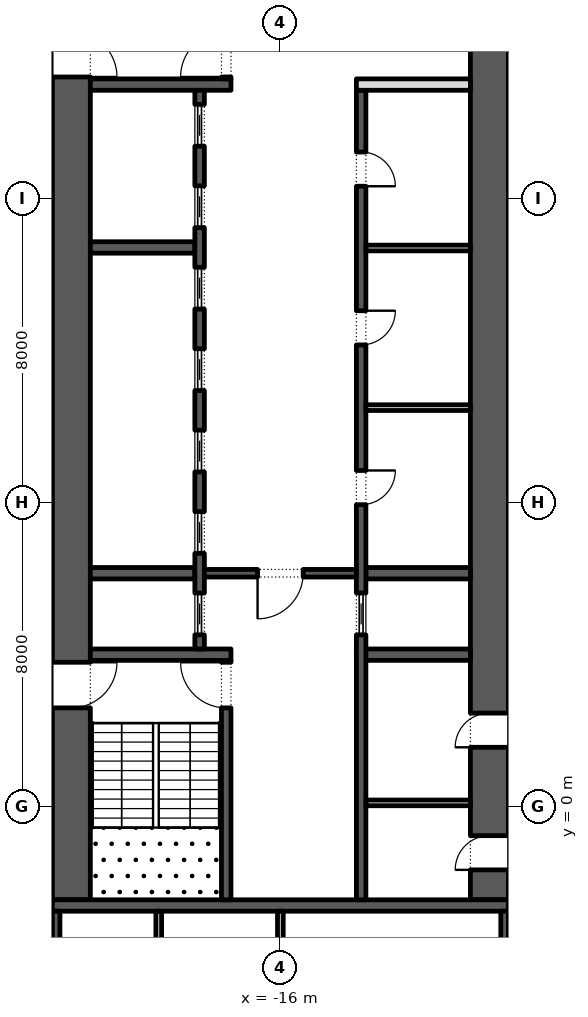
"""IFC4 building model, lengths in metres.
Left out: names, types, materials, properties, quantities, classifications, styles, units other than length and angle.
Written with IfcOpenShell. Run it as: python <this file> out.ifc"""

import sys

from ifc_helpers import new_model, si_unit, direction, frame, frame_2d, origin, place, context, subcontext, project, spatial, rectangle, extrude, element, fill, save


model = new_model("IFC4")
c1 = context("Model", 3, precision=1e-05, world=origin(), true_north=direction((0.0, 1.0)))
c2 = subcontext(c1, "Body", "Model", "MODEL_VIEW")
j1 = project(units=[si_unit("LENGTHUNIT", "METRE"), si_unit("PLANEANGLEUNIT", "RADIAN")], contexts=[c1])
p1 = place(None, origin())
s1 = spatial("IfcSite", under=j1, at=p1, CompositionType="ELEMENT")
p2 = place(p1, origin())
s2 = spatial("IfcBuilding", under=s1, at=p2, CompositionType="ELEMENT")
p3 = place(p2, frame((0.0, 0.0, 90.0)))
s3 = spatial("IfcBuildingStorey", under=s2, at=p3, CompositionType="ELEMENT", Elevation=90.0)
p4 = place(p3, frame((-21.5, -2.45, 0.0), z_axis=(0.0, 0.0, 1.0), x_axis=(0.0, 1.0, 0.0)))
e1 = element("IfcWall", 1, at=p4, inside=s3, PredefinedType="SHEAR", context=c2, shape_type="SweptSolid", body=[
    extrude(rectangle(XDim=27.9, YDim=1.0, at=frame_2d((13.95, 0.0))), origin(), (0.0, 0.0, 1.0), 3.9),
])
p5 = place(p4, frame((5.05, 0.0, 0.0)))
e2 = element("IfcOpeningElement", 2, at=p5, cuts=e1, PredefinedType="OPENING", context=c2, shape_type="SweptSolid", body=[
    extrude(rectangle(XDim=1.2, YDim=2.1, at=frame_2d((0.6, 1.05))), frame((0.0, 0.51, 0.0), z_axis=(0.0, -1.0, 0.0), x_axis=(1.0, 0.0, 0.0)), (0.0, 0.0, 1.0), 1.02),
])
p6 = place(p4, frame((21.65, 0.0, 0.0)))
e3 = element("IfcOpeningElement", 3, at=p6, cuts=e1, PredefinedType="OPENING", context=c2, shape_type="SweptSolid", body=[
    extrude(rectangle(XDim=1.2, YDim=2.1, at=frame_2d((0.6, 1.05))), frame((0.0, 0.51, 0.0), z_axis=(0.0, -1.0, 0.0), x_axis=(1.0, 0.0, 0.0)), (0.0, 0.0, 1.0), 1.02),
])
p7 = place(p3, frame((-10.5, -2.45, 0.0), z_axis=(0.0, 0.0, 1.0), x_axis=(0.0, 1.0, 0.0)))
e4 = element("IfcWall", 4, at=p7, inside=s3, PredefinedType="SHEAR", context=c2, shape_type="SweptSolid", body=[
    extrude(rectangle(XDim=27.9, YDim=1.0, at=frame_2d((13.95, 0.0))), origin(), (0.0, 0.0, 1.0), 3.9),
])
p8 = place(p7, frame((23.65, 0.0, 0.0)))
e5 = element("IfcOpeningElement", 5, at=p8, cuts=e4, PredefinedType="OPENING", context=c2, shape_type="SweptSolid", body=[
    extrude(rectangle(XDim=2.4, YDim=2.1, at=frame_2d((1.2, 1.05))), frame((0.0, 0.51, 0.0), z_axis=(0.0, -1.0, 0.0), x_axis=(1.0, 0.0, 0.0)), (0.0, 0.0, 1.0), 1.02),
])
p9 = place(p7, frame((0.788, 0.0, 0.0)))
e6 = element("IfcOpeningElement", 6, at=p9, cuts=e4, PredefinedType="OPENING", context=c2, shape_type="SweptSolid", body=[
    extrude(rectangle(XDim=0.9, YDim=2.1, at=frame_2d((0.45, 1.05))), frame((0.0, 0.51, 0.0), z_axis=(0.0, -1.0, 0.0), x_axis=(1.0, 0.0, 0.0)), (0.0, 0.0, 1.0), 1.02),
])
p10 = place(p7, frame((4.012, 0.0, 0.0)))
e7 = element("IfcOpeningElement", 7, at=p10, cuts=e4, PredefinedType="OPENING", context=c2, shape_type="SweptSolid", body=[
    extrude(rectangle(XDim=0.9, YDim=2.1, at=frame_2d((0.45, 1.05))), frame((0.0, 0.51, 0.0), z_axis=(0.0, -1.0, 0.0), x_axis=(1.0, 0.0, 0.0)), (0.0, 0.0, 1.0), 1.02),
])
p11 = place(p3, frame((-22.0, -2.6, 0.0), z_axis=(0.0, 0.0, 1.0), x_axis=(1.0, 0.0, 0.0)))
e8 = element("IfcWall", 8, at=p11, inside=s3, PredefinedType="SHEAR", context=c2, shape_type="SweptSolid", body=[
    extrude(rectangle(XDim=12.0, YDim=0.3, at=frame_2d((6.0, 0.0))), origin(), (0.0, 0.0, 1.0), 3.9),
])
p12 = place(p3, frame((-21.0, 4.0, 0.0), z_axis=(0.0, 0.0, 1.0), x_axis=(1.0, 0.0, 0.0)))
e9 = element("IfcWall", 9, at=p12, inside=s3, PredefinedType="SHEAR", context=c2, shape_type="SweptSolid", body=[
    extrude(rectangle(XDim=3.7, YDim=0.3, at=frame_2d((1.85, 0.0))), origin(), (0.0, 0.0, 1.0), 3.9),
])
p13 = place(p3, frame((-17.425, -2.45, 0.0), z_axis=(0.0, 0.0, 1.0), x_axis=(0.0, 1.0, 0.0)))
e10 = element("IfcWall", 10, at=p13, inside=s3, PredefinedType="SHEAR", context=c2, shape_type="SweptSolid", body=[
    extrude(rectangle(XDim=6.3, YDim=0.25, at=frame_2d((3.15, 0.0))), origin(), (0.0, 0.0, 1.0), 3.9),
])
p14 = place(p13, frame((5.05, 0.0, 0.0)))
e11 = element("IfcOpeningElement", 11, at=p14, cuts=e10, PredefinedType="OPENING", context=c2, shape_type="SweptSolid", body=[
    extrude(rectangle(XDim=1.2, YDim=2.1, at=frame_2d((0.6, 1.05))), frame((0.0, 0.135, 0.0), z_axis=(0.0, -1.0, 0.0), x_axis=(1.0, 0.0, 0.0)), (0.0, 0.0, 1.0), 0.27),
])
p15 = place(p3, frame((-21.0, 19.0, 0.0), z_axis=(0.0, 0.0, 1.0), x_axis=(1.0, 0.0, 0.0)))
e12 = element("IfcWall", 12, at=p15, inside=s3, PredefinedType="SHEAR", context=c2, shape_type="SweptSolid", body=[
    extrude(rectangle(XDim=3.7, YDim=0.3, at=frame_2d((1.85, 0.0))), origin(), (0.0, 0.0, 1.0), 3.9),
])
p16 = place(p3, frame((-17.425, 19.15, 0.0), z_axis=(0.0, 0.0, 1.0), x_axis=(0.0, 1.0, 0.0)))
e13 = element("IfcWall", 13, at=p16, inside=s3, PredefinedType="SHEAR", context=c2, shape_type="SweptSolid", body=[
    extrude(rectangle(XDim=6.3, YDim=0.25, at=frame_2d((3.15, 0.0))), origin(), (0.0, 0.0, 1.0), 3.9),
])
p17 = place(p16, frame((0.05, 0.0, 0.0)))
e14 = element("IfcOpeningElement", 14, at=p17, cuts=e13, PredefinedType="OPENING", context=c2, shape_type="SweptSolid", body=[
    extrude(rectangle(XDim=1.2, YDim=2.1, at=frame_2d((0.6, 1.05))), frame((0.0, 0.135, 0.0), z_axis=(0.0, -1.0, 0.0), x_axis=(1.0, 0.0, 0.0)), (0.0, 0.0, 1.0), 0.27),
])
for number, where, z_axis, x_axis in (
    (15, (-21.0, 6.143, 0.0), (0.0, 0.0, 1.0), (1.0, 0.0, 0.0)),
    (16, (-21.0, 14.714, 0.0), (0.0, 0.0, 1.0), (1.0, 0.0, 0.0)),
):
    element("IfcWall", number, at=place(p3, frame(where, z_axis=z_axis, x_axis=x_axis)), inside=s3, PredefinedType="SHEAR", context=c2, shape_type="SweptSolid", body=[
        extrude(rectangle(XDim=2.75, YDim=0.3, at=frame_2d((1.375, 0.0))), origin(), (0.0, 0.0, 1.0), 3.9),
    ])
p18 = place(p3, frame((-18.125, 4.15, 0.0), z_axis=(0.0, 0.0, 1.0), x_axis=(0.0, 1.0, 0.0)))
e17 = element("IfcWall", 17, at=p18, inside=s3, PredefinedType="SHEAR", context=c2, shape_type="SweptSolid", body=[
    extrude(rectangle(XDim=14.7, YDim=0.25, at=frame_2d((7.35, 0.0))), origin(), (0.0, 0.0, 1.0), 3.9),
])
p19 = place(p18, frame((0.371, 0.0, 0.0)))
e18 = element("IfcOpeningElement", 18, at=p19, cuts=e17, PredefinedType="OPENING", context=c2, shape_type="SweptSolid", body=[
    extrude(rectangle(XDim=1.1, YDim=2.1, at=frame_2d((0.55, 1.05))), frame((0.0, 0.135, 0.0), z_axis=(0.0, -1.0, 0.0), x_axis=(1.0, 0.0, 0.0)), (0.0, 0.0, 1.0), 0.27),
])
p20 = place(p18, frame((2.514, 0.0, 0.0)))
e19 = element("IfcOpeningElement", 19, at=p20, cuts=e17, PredefinedType="OPENING", context=c2, shape_type="SweptSolid", body=[
    extrude(rectangle(XDim=1.1, YDim=2.1, at=frame_2d((0.55, 1.05))), frame((0.0, 0.135, 0.0), z_axis=(0.0, -1.0, 0.0), x_axis=(1.0, 0.0, 0.0)), (0.0, 0.0, 1.0), 0.27),
])
p21 = place(p18, frame((4.657, 0.0, 0.0)))
e20 = element("IfcOpeningElement", 20, at=p21, cuts=e17, PredefinedType="OPENING", context=c2, shape_type="SweptSolid", body=[
    extrude(rectangle(XDim=1.1, YDim=2.1, at=frame_2d((0.55, 1.05))), frame((0.0, 0.135, 0.0), z_axis=(0.0, -1.0, 0.0), x_axis=(1.0, 0.0, 0.0)), (0.0, 0.0, 1.0), 0.27),
])
p22 = place(p18, frame((6.8, 0.0, 0.0)))
e21 = element("IfcOpeningElement", 21, at=p22, cuts=e17, PredefinedType="OPENING", context=c2, shape_type="SweptSolid", body=[
    extrude(rectangle(XDim=1.1, YDim=2.1, at=frame_2d((0.55, 1.05))), frame((0.0, 0.135, 0.0), z_axis=(0.0, -1.0, 0.0), x_axis=(1.0, 0.0, 0.0)), (0.0, 0.0, 1.0), 0.27),
])
p23 = place(p18, frame((8.943, 0.0, 0.0)))
e22 = element("IfcOpeningElement", 22, at=p23, cuts=e17, PredefinedType="OPENING", context=c2, shape_type="SweptSolid", body=[
    extrude(rectangle(XDim=1.1, YDim=2.1, at=frame_2d((0.55, 1.05))), frame((0.0, 0.135, 0.0), z_axis=(0.0, -1.0, 0.0), x_axis=(1.0, 0.0, 0.0)), (0.0, 0.0, 1.0), 0.27),
])
p24 = place(p18, frame((11.086, 0.0, 0.0)))
e23 = element("IfcOpeningElement", 23, at=p24, cuts=e17, PredefinedType="OPENING", context=c2, shape_type="SweptSolid", body=[
    extrude(rectangle(XDim=1.1, YDim=2.1, at=frame_2d((0.55, 1.05))), frame((0.0, 0.135, 0.0), z_axis=(0.0, -1.0, 0.0), x_axis=(1.0, 0.0, 0.0)), (0.0, 0.0, 1.0), 0.27),
])
p25 = place(p18, frame((13.229, 0.0, 0.0)))
e24 = element("IfcOpeningElement", 24, at=p25, cuts=e17, PredefinedType="OPENING", context=c2, shape_type="SweptSolid", body=[
    extrude(rectangle(XDim=1.1, YDim=2.1, at=frame_2d((0.55, 1.05))), frame((0.0, 0.135, 0.0), z_axis=(0.0, -1.0, 0.0), x_axis=(1.0, 0.0, 0.0)), (0.0, 0.0, 1.0), 0.27),
])
p26 = place(p3, frame((-14.0, 4.0, 0.0), z_axis=(0.0, 0.0, 1.0), x_axis=(1.0, 0.0, 0.0)))
e25 = element("IfcWall", 25, at=p26, inside=s3, PredefinedType="SHEAR", context=c2, shape_type="SweptSolid", body=[
    extrude(rectangle(XDim=3.0, YDim=0.3, at=frame_2d((1.5, 0.0))), origin(), (0.0, 0.0, 1.0), 3.9),
])
p27 = place(p3, frame((-13.75, 6.143, 0.0), z_axis=(0.0, 0.0, 1.0), x_axis=(1.0, 0.0, 0.0)))
e26 = element("IfcWall", 26, at=p27, inside=s3, PredefinedType="SHEAR", context=c2, shape_type="SweptSolid", body=[
    extrude(rectangle(XDim=2.75, YDim=0.3, at=frame_2d((1.375, 0.0))), origin(), (0.0, 0.0, 1.0), 3.9),
])
p28 = place(p3, frame((-13.875, -2.45, 0.0), z_axis=(0.0, 0.0, 1.0), x_axis=(0.0, 1.0, 0.0)))
e27 = element("IfcWall", 27, at=p28, inside=s3, PredefinedType="SHEAR", context=c2, shape_type="SweptSolid", body=[
    extrude(rectangle(XDim=21.3, YDim=0.25, at=frame_2d((10.65, 0.0))), origin(), (0.0, 0.0, 1.0), 3.9),
])
p29 = place(p28, frame((10.396, 0.0, 0.0)))
e28 = element("IfcOpeningElement", 28, at=p29, cuts=e27, PredefinedType="OPENING", context=c2, shape_type="SweptSolid", body=[
    extrude(rectangle(XDim=0.9, YDim=2.1, at=frame_2d((0.45, 1.05))), frame((0.0, 0.135, 0.0), z_axis=(0.0, -1.0, 0.0), x_axis=(1.0, 0.0, 0.0)), (0.0, 0.0, 1.0), 0.27),
])
p30 = place(p28, frame((14.6, 0.0, 0.0)))
e29 = element("IfcOpeningElement", 29, at=p30, cuts=e27, PredefinedType="OPENING", context=c2, shape_type="SweptSolid", body=[
    extrude(rectangle(XDim=0.9, YDim=2.1, at=frame_2d((0.45, 1.05))), frame((0.0, 0.135, 0.0), z_axis=(0.0, -1.0, 0.0), x_axis=(1.0, 0.0, 0.0)), (0.0, 0.0, 1.0), 0.27),
])
p31 = place(p28, frame((18.775, 0.0, 0.0)))
e30 = element("IfcOpeningElement", 30, at=p31, cuts=e27, PredefinedType="OPENING", context=c2, shape_type="SweptSolid", body=[
    extrude(rectangle(XDim=0.9, YDim=2.1, at=frame_2d((0.45, 1.05))), frame((0.0, 0.135, 0.0), z_axis=(0.0, -1.0, 0.0), x_axis=(1.0, 0.0, 0.0)), (0.0, 0.0, 1.0), 0.27),
])
p32 = place(p28, frame((6.971, 0.0, 0.0)))
e31 = element("IfcOpeningElement", 31, at=p32, cuts=e27, PredefinedType="OPENING", context=c2, shape_type="SweptSolid", body=[
    extrude(rectangle(XDim=1.1, YDim=2.1, at=frame_2d((0.55, 1.05))), frame((0.0, 0.135, 0.0), z_axis=(0.0, -1.0, 0.0), x_axis=(1.0, 0.0, 0.0)), (0.0, 0.0, 1.0), 0.27),
])
p33 = place(p3, frame((-14.0, 19.0, 0.0), z_axis=(0.0, 0.0, 1.0), x_axis=(1.0, 0.0, 0.0)))
e32 = element("IfcWall", 32, at=p33, inside=s3, PredefinedType="PARTITIONING", context=c2, shape_type="SweptSolid", body=[
    extrude(rectangle(XDim=3.0, YDim=0.3, at=frame_2d((1.5, 0.0))), origin(), (0.0, 0.0, 1.0), 3.9),
])
for number, where, z_axis, x_axis in (
    (33, (-13.75, 10.5, 0.0), (0.0, 0.0, 1.0), (1.0, 0.0, 0.0)),
    (34, (-13.75, 14.7, 0.0), (0.0, 0.0, 1.0), (1.0, 0.0, 0.0)),
):
    element("IfcWall", number, at=place(p3, frame(where, z_axis=z_axis, x_axis=x_axis)), inside=s3, PredefinedType="PARTITIONING", context=c2, shape_type="SweptSolid", body=[
        extrude(rectangle(XDim=2.75, YDim=0.15, at=frame_2d((1.375, 0.0))), origin(), (0.0, 0.0, 1.0), 3.9),
    ])
p34 = place(p3, frame((-18.0, 6.143, 0.0), z_axis=(0.0, 0.0, 1.0), x_axis=(1.0, 0.0, 0.0)))
e35 = element("IfcWall", 35, at=p34, inside=s3, PredefinedType="SHEAR", context=c2, shape_type="SweptSolid", body=[
    extrude(rectangle(XDim=4.0, YDim=0.2, at=frame_2d((2.0, 0.0))), origin(), (0.0, 0.0, 1.0), 3.9),
])
p35 = place(p34, frame((1.4, 0.0, 0.0)))
e36 = element("IfcOpeningElement", 36, at=p35, cuts=e35, PredefinedType="OPENING", context=c2, shape_type="SweptSolid", body=[
    extrude(rectangle(XDim=1.2, YDim=2.1, at=frame_2d((0.6, 1.05))), frame((0.0, 0.11, 0.0), z_axis=(0.0, -1.0, 0.0), x_axis=(1.0, 0.0, 0.0)), (0.0, 0.0, 1.0), 0.22),
])
p36 = place(p3, frame((-13.75, 0.1, 0.0), z_axis=(0.0, 0.0, 1.0), x_axis=(1.0, 0.0, 0.0)))
e37 = element("IfcWall", 37, at=p36, inside=s3, PredefinedType="PARTITIONING", context=c2, shape_type="SweptSolid", body=[
    extrude(rectangle(XDim=2.75, YDim=0.15, at=frame_2d((1.375, 0.0))), origin(), (0.0, 0.0, 1.0), 3.9),
])
p37 = place(p3, frame((-21.9, -15.8, 0.0), z_axis=(0.0, 0.0, 1.0), x_axis=(0.0, 1.0, 0.0)))
e38 = element("IfcWall", 38, at=p37, inside=s3, PredefinedType="SHEAR", context=c2, shape_type="SweptSolid", body=[
    extrude(rectangle(XDim=13.05, YDim=0.2, at=frame_2d((6.525, 0.0))), origin(), (0.0, 0.0, 1.0), 3.9),
])
p38 = place(p37, frame((4.488, 0.0, 0.0)))
e39 = element("IfcOpeningElement", 39, at=p38, cuts=e38, PredefinedType="OPENING", context=c2, shape_type="SweptSolid", body=[
    extrude(rectangle(XDim=0.9, YDim=2.1, at=frame_2d((0.45, 1.05))), frame((0.0, 0.11, 0.0), z_axis=(0.0, -1.0, 0.0), x_axis=(1.0, 0.0, 0.0)), (0.0, 0.0, 1.0), 0.22),
])
p39 = place(p37, frame((11.038, 0.0, 0.0)))
e40 = element("IfcOpeningElement", 40, at=p39, cuts=e38, PredefinedType="OPENING", context=c2, shape_type="SweptSolid", body=[
    extrude(rectangle(XDim=1.0, YDim=2.1, at=frame_2d((0.5, 1.05))), frame((0.0, 0.11, 0.0), z_axis=(0.0, -1.0, 0.0), x_axis=(1.0, 0.0, 0.0)), (0.0, 0.0, 1.0), 0.22),
])
p40 = place(p3, frame((-10.1, -15.8, 0.0), z_axis=(0.0, 0.0, 1.0), x_axis=(0.0, 1.0, 0.0)))
e41 = element("IfcWall", 41, at=p40, inside=s3, PredefinedType="SHEAR", context=c2, shape_type="SweptSolid", body=[
    extrude(rectangle(XDim=13.05, YDim=0.2, at=frame_2d((6.525, 0.0))), origin(), (0.0, 0.0, 1.0), 3.9),
])
p41 = place(p40, frame((6.075, 0.0, 0.0)))
e42 = element("IfcOpeningElement", 42, at=p41, cuts=e41, PredefinedType="OPENING", context=c2, shape_type="SweptSolid", body=[
    extrude(rectangle(XDim=0.9, YDim=2.1, at=frame_2d((0.45, 1.05))), frame((0.0, 0.11, 0.0), z_axis=(0.0, -1.0, 0.0), x_axis=(1.0, 0.0, 0.0)), (0.0, 0.0, 1.0), 0.22),
])
p42 = place(p3, frame((-16.0, -15.8, 0.0), z_axis=(0.0, 0.0, 1.0), x_axis=(0.0, 1.0, 0.0)))
e43 = element("IfcWall", 43, at=p42, inside=s3, PredefinedType="PARTITIONING", context=c2, shape_type="SweptSolid", body=[
    extrude(rectangle(XDim=13.05, YDim=0.15, at=frame_2d((6.525, 0.0))), origin(), (0.0, 0.0, 1.0), 3.9),
])
p43 = place(p42, frame((11.087, 0.0, 0.0)))
e44 = element("IfcOpeningElement", 44, at=p43, cuts=e43, PredefinedType="OPENING", context=c2, shape_type="SweptSolid", body=[
    extrude(rectangle(XDim=0.9, YDim=2.1, at=frame_2d((0.45, 1.05))), frame((0.0, 0.085, 0.0), z_axis=(0.0, -1.0, 0.0), x_axis=(1.0, 0.0, 0.0)), (0.0, 0.0, 1.0), 0.17),
])
p44 = place(p3, frame((-19.2, -5.775, 0.0), z_axis=(0.0, 0.0, 1.0), x_axis=(0.0, 1.0, 0.0)))
e45 = element("IfcWall", 45, at=p44, inside=s3, PredefinedType="PARTITIONING", context=c2, shape_type="SweptSolid", body=[
    extrude(rectangle(XDim=3.025, YDim=0.15, at=frame_2d((1.512, 0.0))), origin(), (0.0, 0.0, 1.0), 3.9),
])
p45 = place(p19, origin())
e46 = element("IfcDoor", 46, at=p45, inside=s3, OperationType="SLIDING_TO_LEFT", PredefinedType="DOOR", context=c2, shape_type="SweptSolid", body=[
    extrude(rectangle(XDim=1.1, YDim=2.1, at=frame_2d((0.55, 1.05))), frame((0.0, 0.025, 0.0), z_axis=(0.0, -1.0, 0.0), x_axis=(1.0, 0.0, 0.0)), (0.0, 0.0, 1.0), 0.05),
])
fill(e18, e46)
p46 = place(p20, origin())
e47 = element("IfcDoor", 47, at=p46, inside=s3, OperationType="SLIDING_TO_LEFT", PredefinedType="DOOR", context=c2, shape_type="SweptSolid", body=[
    extrude(rectangle(XDim=1.1, YDim=2.1, at=frame_2d((0.55, 1.05))), frame((0.0, 0.025, 0.0), z_axis=(0.0, -1.0, 0.0), x_axis=(1.0, 0.0, 0.0)), (0.0, 0.0, 1.0), 0.05),
])
fill(e19, e47)
p47 = place(p21, origin())
e48 = element("IfcDoor", 48, at=p47, inside=s3, OperationType="SLIDING_TO_LEFT", PredefinedType="DOOR", context=c2, shape_type="SweptSolid", body=[
    extrude(rectangle(XDim=1.1, YDim=2.1, at=frame_2d((0.55, 1.05))), frame((0.0, 0.025, 0.0), z_axis=(0.0, -1.0, 0.0), x_axis=(1.0, 0.0, 0.0)), (0.0, 0.0, 1.0), 0.05),
])
fill(e20, e48)
p48 = place(p22, origin())
e49 = element("IfcDoor", 49, at=p48, inside=s3, OperationType="SLIDING_TO_LEFT", PredefinedType="DOOR", context=c2, shape_type="SweptSolid", body=[
    extrude(rectangle(XDim=1.1, YDim=2.1, at=frame_2d((0.55, 1.05))), frame((0.0, 0.025, 0.0), z_axis=(0.0, -1.0, 0.0), x_axis=(1.0, 0.0, 0.0)), (0.0, 0.0, 1.0), 0.05),
])
fill(e21, e49)
p49 = place(p23, origin())
e50 = element("IfcDoor", 50, at=p49, inside=s3, OperationType="SLIDING_TO_LEFT", PredefinedType="DOOR", context=c2, shape_type="SweptSolid", body=[
    extrude(rectangle(XDim=1.1, YDim=2.1, at=frame_2d((0.55, 1.05))), frame((0.0, 0.025, 0.0), z_axis=(0.0, -1.0, 0.0), x_axis=(1.0, 0.0, 0.0)), (0.0, 0.0, 1.0), 0.05),
])
fill(e22, e50)
p50 = place(p24, origin())
e51 = element("IfcDoor", 51, at=p50, inside=s3, OperationType="SLIDING_TO_LEFT", PredefinedType="DOOR", context=c2, shape_type="SweptSolid", body=[
    extrude(rectangle(XDim=1.1, YDim=2.1, at=frame_2d((0.55, 1.05))), frame((0.0, 0.025, 0.0), z_axis=(0.0, -1.0, 0.0), x_axis=(1.0, 0.0, 0.0)), (0.0, 0.0, 1.0), 0.05),
])
fill(e23, e51)
p51 = place(p25, origin())
e52 = element("IfcDoor", 52, at=p51, inside=s3, OperationType="SLIDING_TO_LEFT", PredefinedType="DOOR", context=c2, shape_type="SweptSolid", body=[
    extrude(rectangle(XDim=1.1, YDim=2.1, at=frame_2d((0.55, 1.05))), frame((0.0, 0.025, 0.0), z_axis=(0.0, -1.0, 0.0), x_axis=(1.0, 0.0, 0.0)), (0.0, 0.0, 1.0), 0.05),
])
fill(e24, e52)
p52 = place(p29, frame((0.9, -0.2, 0.0), z_axis=(0.0, 0.0, 1.0), x_axis=(-1.0, 0.0, 0.0)))
e53 = element("IfcDoor", 53, at=p52, inside=s3, OperationType="SINGLE_SWING_RIGHT", PredefinedType="DOOR", context=c2, shape_type="SweptSolid", body=[
    extrude(rectangle(XDim=0.9, YDim=2.1, at=frame_2d((0.45, 1.05))), frame((0.0, -0.075, 0.0), z_axis=(0.0, -1.0, 0.0), x_axis=(1.0, 0.0, 0.0)), (0.0, 0.0, 1.0), 0.05),
])
fill(e28, e53)
p53 = place(p30, frame((0.9, -0.2, 0.0), z_axis=(0.0, 0.0, 1.0), x_axis=(-1.0, 0.0, 0.0)))
e54 = element("IfcDoor", 54, at=p53, inside=s3, OperationType="SINGLE_SWING_RIGHT", PredefinedType="DOOR", context=c2, shape_type="SweptSolid", body=[
    extrude(rectangle(XDim=0.9, YDim=2.1, at=frame_2d((0.45, 1.05))), frame((0.0, -0.075, 0.0), z_axis=(0.0, -1.0, 0.0), x_axis=(1.0, 0.0, 0.0)), (0.0, 0.0, 1.0), 0.05),
])
fill(e29, e54)
p54 = place(p31, frame((0.9, -0.2, 0.0), z_axis=(0.0, 0.0, 1.0), x_axis=(-1.0, 0.0, 0.0)))
e55 = element("IfcDoor", 55, at=p54, inside=s3, OperationType="SINGLE_SWING_LEFT", PredefinedType="DOOR", context=c2, shape_type="SweptSolid", body=[
    extrude(rectangle(XDim=0.9, YDim=2.1, at=frame_2d((0.45, 1.05))), frame((0.0, -0.075, 0.0), z_axis=(0.0, -1.0, 0.0), x_axis=(1.0, 0.0, 0.0)), (0.0, 0.0, 1.0), 0.05),
])
fill(e30, e55)
p55 = place(p32, origin())
e56 = element("IfcDoor", 56, at=p55, inside=s3, OperationType="SLIDING_TO_LEFT", PredefinedType="DOOR", context=c2, shape_type="SweptSolid", body=[
    extrude(rectangle(XDim=1.1, YDim=2.1, at=frame_2d((0.55, 1.05))), frame((0.0, 0.025, 0.0), z_axis=(0.0, -1.0, 0.0), x_axis=(1.0, 0.0, 0.0)), (0.0, 0.0, 1.0), 0.05),
])
fill(e31, e56)
p56 = place(p35, frame((1.2, 0.0, 0.0), z_axis=(0.0, 0.0, 1.0), x_axis=(-1.0, 0.0, 0.0)))
e57 = element("IfcDoor", 57, at=p56, inside=s3, OperationType="SINGLE_SWING_LEFT", PredefinedType="DOOR", context=c2, shape_type="SweptSolid", body=[
    extrude(rectangle(XDim=1.2, YDim=2.1, at=frame_2d((0.6, 1.05))), frame((0.0, 0.025, 0.0), z_axis=(0.0, -1.0, 0.0), x_axis=(1.0, 0.0, 0.0)), (0.0, 0.0, 1.0), 0.05),
])
fill(e36, e57)
p57 = place(p14, origin())
e58 = element("IfcDoor", 58, at=p57, inside=s3, OperationType="SINGLE_SWING_LEFT", PredefinedType="DOOR", context=c2, shape_type="SweptSolid", body=[
    extrude(rectangle(XDim=1.2, YDim=2.1, at=frame_2d((0.6, 1.05))), frame((0.0, 0.025, 0.0), z_axis=(0.0, -1.0, 0.0), x_axis=(1.0, 0.0, 0.0)), (0.0, 0.0, 1.0), 0.05),
])
fill(e11, e58)
p58 = place(p5, frame((1.2, 0.0, 0.0), z_axis=(0.0, 0.0, 1.0), x_axis=(-1.0, 0.0, 0.0)))
e59 = element("IfcDoor", 59, at=p58, inside=s3, OperationType="SINGLE_SWING_RIGHT", PredefinedType="DOOR", context=c2, shape_type="SweptSolid", body=[
    extrude(rectangle(XDim=1.2, YDim=2.1, at=frame_2d((0.6, 1.05))), frame((0.0, 0.025, 0.0), z_axis=(0.0, -1.0, 0.0), x_axis=(1.0, 0.0, 0.0)), (0.0, 0.0, 1.0), 0.05),
])
fill(e2, e59)
p59 = place(p17, origin())
e60 = element("IfcDoor", 60, at=p59, inside=s3, OperationType="SINGLE_SWING_RIGHT", PredefinedType="DOOR", context=c2, shape_type="SweptSolid", body=[
    extrude(rectangle(XDim=1.2, YDim=2.1, at=frame_2d((0.6, 1.05))), frame((0.0, 0.025, 0.0), z_axis=(0.0, -1.0, 0.0), x_axis=(1.0, 0.0, 0.0)), (0.0, 0.0, 1.0), 0.05),
])
fill(e14, e60)
p60 = place(p6, frame((1.2, 0.0, 0.0), z_axis=(0.0, 0.0, 1.0), x_axis=(-1.0, 0.0, 0.0)))
e61 = element("IfcDoor", 61, at=p60, inside=s3, OperationType="SINGLE_SWING_LEFT", PredefinedType="DOOR", context=c2, shape_type="SweptSolid", body=[
    extrude(rectangle(XDim=1.2, YDim=2.1, at=frame_2d((0.6, 1.05))), frame((0.0, 0.025, 0.0), z_axis=(0.0, -1.0, 0.0), x_axis=(1.0, 0.0, 0.0)), (0.0, 0.0, 1.0), 0.05),
])
fill(e3, e61)
p61 = place(p9, origin())
e62 = element("IfcDoor", 62, at=p61, inside=s3, OperationType="SINGLE_SWING_RIGHT", PredefinedType="DOOR", context=c2, shape_type="SweptSolid", body=[
    extrude(rectangle(XDim=0.9, YDim=2.1, at=frame_2d((0.45, 1.05))), frame((0.0, 0.5, 0.0), z_axis=(0.0, -1.0, 0.0), x_axis=(1.0, 0.0, 0.0)), (0.0, 0.0, 1.0), 0.05),
])
fill(e6, e62)
p62 = place(p10, origin())
e63 = element("IfcDoor", 63, at=p62, inside=s3, OperationType="SINGLE_SWING_RIGHT", PredefinedType="DOOR", context=c2, shape_type="SweptSolid", body=[
    extrude(rectangle(XDim=0.9, YDim=2.1, at=frame_2d((0.45, 1.05))), frame((0.0, 0.5, 0.0), z_axis=(0.0, -1.0, 0.0), x_axis=(1.0, 0.0, 0.0)), (0.0, 0.0, 1.0), 0.05),
])
fill(e7, e63)
save(model, sys.argv[1])
